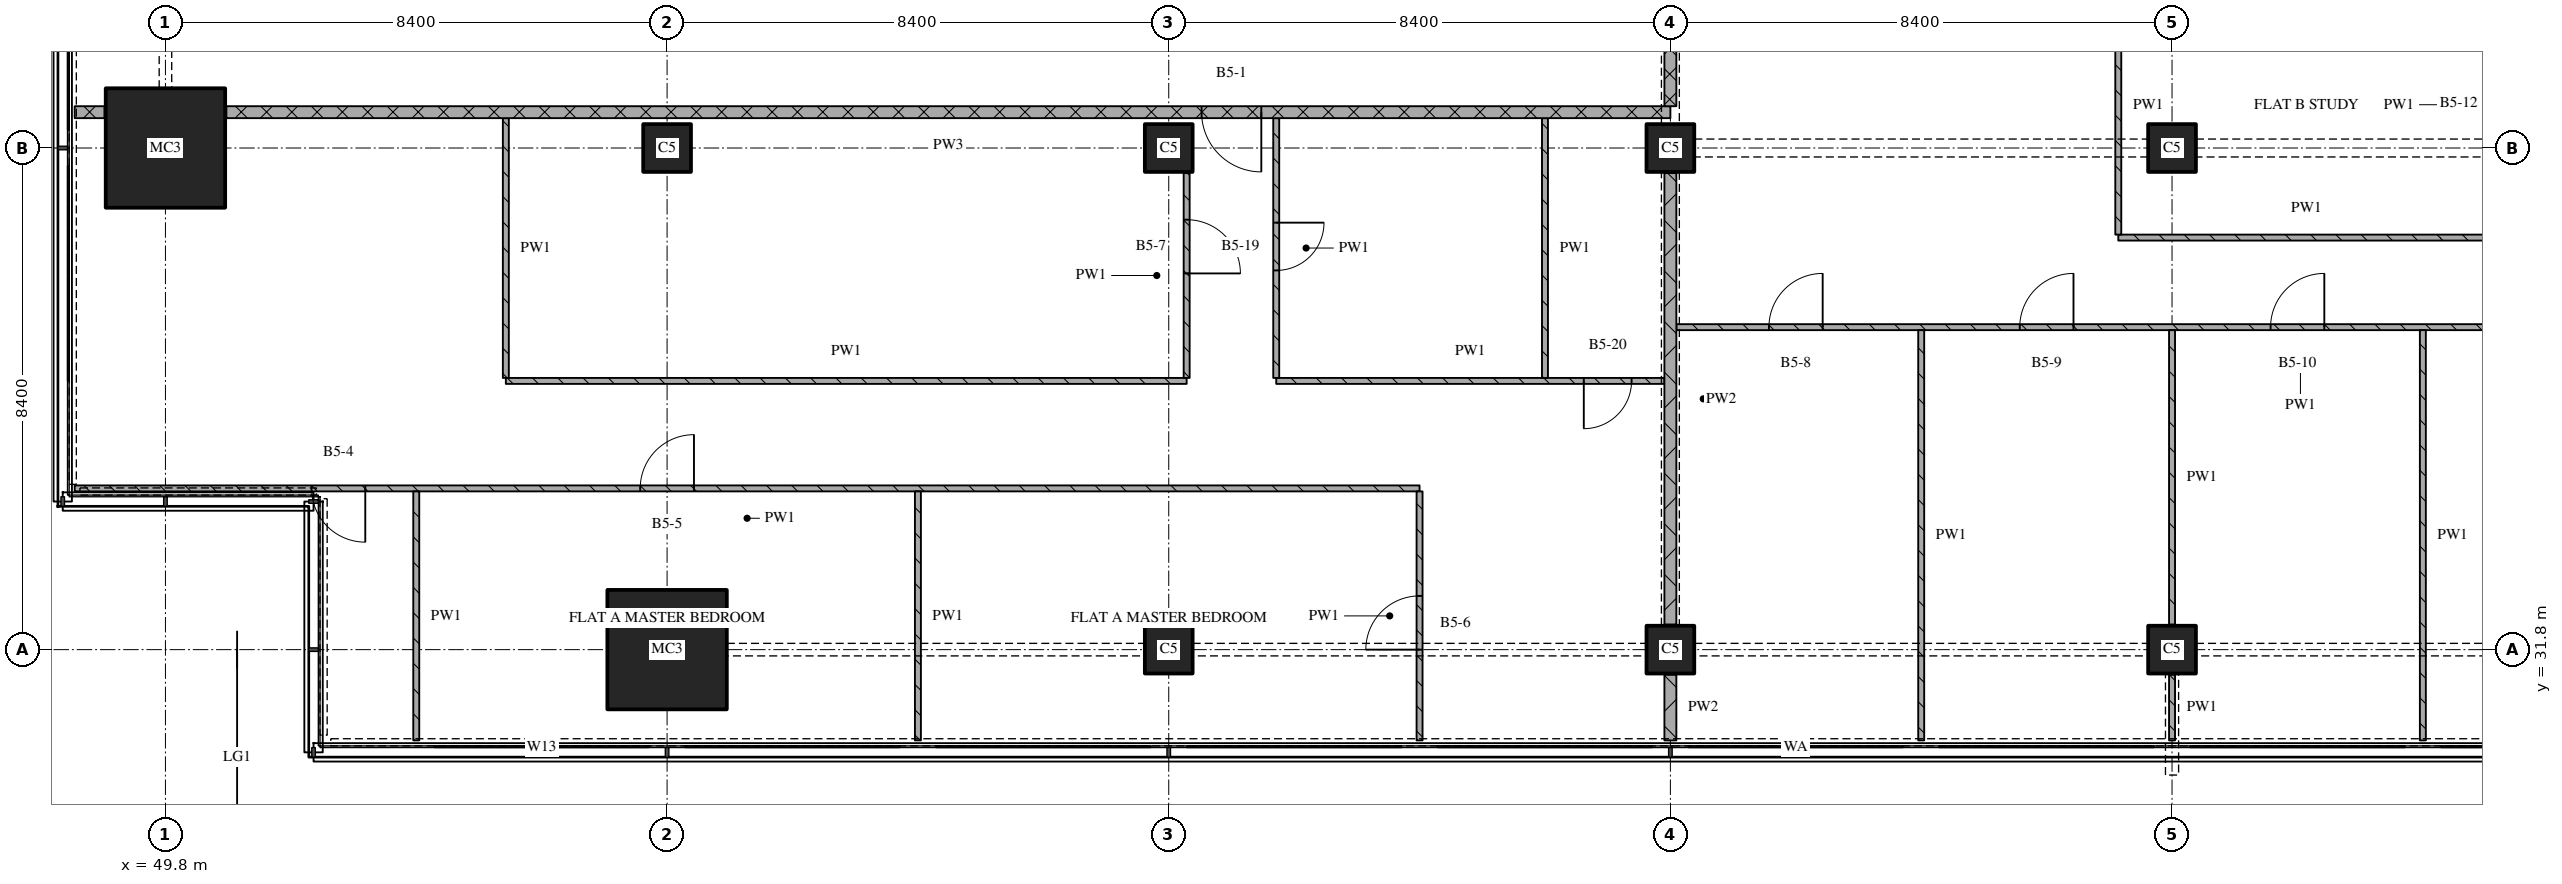
"""IFC4 building model, lengths in metres.
Left out: names, types, materials, properties, quantities, classifications, styles, units other than length and angle.
Written with IfcOpenShell. Run it as: python <this file> out.ifc"""

import sys

from ifc_helpers import new_model, si_unit, direction, frame, frame_2d, origin, origin_2d, place, context, subcontext, project, spatial, rectangle, extrude, element, fill, save


model = new_model("IFC4")
c1 = context("Model", 3, precision=1e-05, world=origin(), true_north=direction((0.0, 1.0)))
c2 = subcontext(c1, "Body", "Model", "MODEL_VIEW")
j1 = project(units=[si_unit("LENGTHUNIT", "METRE"), si_unit("PLANEANGLEUNIT", "RADIAN")], contexts=[c1])
p1 = place(None, origin())
s1 = spatial("IfcSite", under=j1, at=p1, CompositionType="ELEMENT")
p2 = place(p1, origin())
s2 = spatial("IfcBuilding", under=s1, at=p2, CompositionType="ELEMENT")
p3 = place(p2, frame((0.0, 0.0, 138.45)))
s3 = spatial("IfcBuildingStorey", under=s2, at=p3, CompositionType="ELEMENT", Elevation=138.45)
for number, where, z_axis, x_axis in (
    (1, (49.8, 40.2, 0.0), (0.0, 0.0, 1.0), (1.0, 0.0, 0.0)),
    (2, (58.2, 31.8, 0.0), (0.0, 0.0, 1.0), (1.0, 0.0, 0.0)),
):
    element("IfcColumn", number, at=place(p3, frame(where, z_axis=z_axis, x_axis=x_axis)), inside=s3, PredefinedType="COLUMN", context=c2, shape_type="SweptSolid", body=[
        extrude(rectangle(XDim=2.0, YDim=2.0, at=origin_2d()), origin(), (0.0, 0.0, 1.0), 3.6),
    ])
for number, where, z_axis, x_axis in (
    (3, (58.2, 40.2, 0.0), (0.0, 0.0, 1.0), (1.0, 0.0, 0.0)),
    (4, (66.6, 31.8, 0.0), (0.0, 0.0, 1.0), (1.0, 0.0, 0.0)),
    (5, (66.6, 40.2, 0.0), (0.0, 0.0, 1.0), (1.0, 0.0, 0.0)),
    (6, (75.0, 31.8, 0.0), (0.0, 0.0, 1.0), (1.0, 0.0, 0.0)),
    (7, (75.0, 40.2, 0.0), (0.0, 0.0, 1.0), (1.0, 0.0, 0.0)),
    (8, (83.4, 31.8, 0.0), (0.0, 0.0, 1.0), (1.0, 0.0, 0.0)),
    (9, (83.4, 40.2, 0.0), (0.0, 0.0, 1.0), (1.0, 0.0, 0.0)),
):
    element("IfcColumn", number, at=place(p3, frame(where, z_axis=z_axis, x_axis=x_axis)), inside=s3, PredefinedType="COLUMN", context=c2, shape_type="SweptSolid", body=[
        extrude(rectangle(XDim=0.8, YDim=0.8, at=origin_2d()), origin(), (0.0, 0.0, 1.0), 3.6),
    ])
p4 = place(p3, frame((70.8, 34.5, 0.0), z_axis=(0.0, 0.0, 1.0), x_axis=(-1.0, 0.0, 0.0)))
e10 = element("IfcWall", 10, at=p4, inside=s3, PredefinedType="PARTITIONING", context=c2, shape_type="SweptSolid", body=[
    extrude(rectangle(XDim=22.52, YDim=0.1, at=frame_2d((11.26, 0.0))), origin(), (0.0, 0.0, 1.0), 3.3),
])
p5 = place(p4, frame((12.15, 0.0, 0.0)))
e11 = element("IfcOpeningElement", 11, at=p5, cuts=e10, PredefinedType="OPENING", context=c2, shape_type="SweptSolid", body=[
    extrude(rectangle(XDim=0.9, YDim=2.1, at=frame_2d((0.45, 1.05))), frame((0.0, 0.06, 0.0), z_axis=(0.0, -1.0, 0.0), x_axis=(1.0, 0.0, 0.0)), (0.0, 0.0, 1.0), 0.12),
])
p6 = place(p4, frame((17.654, 0.0, 0.0)))
e12 = element("IfcOpeningElement", 12, at=p6, cuts=e10, PredefinedType="OPENING", context=c2, shape_type="SweptSolid", body=[
    extrude(rectangle(XDim=0.9, YDim=2.1, at=frame_2d((0.45, 1.05))), frame((0.0, 0.06, 0.0), z_axis=(0.0, -1.0, 0.0), x_axis=(1.0, 0.0, 0.0)), (0.0, 0.0, 1.0), 0.12),
])
p7 = place(p3, frame((55.5, 36.3, 0.0), z_axis=(0.0, 0.0, 1.0), x_axis=(1.0, 0.0, 0.0)))
e13 = element("IfcWall", 13, at=p7, inside=s3, PredefinedType="PARTITIONING", context=c2, shape_type="SweptSolid", body=[
    extrude(rectangle(XDim=11.4, YDim=0.1, at=frame_2d((5.7, 0.0))), origin(), (0.0, 0.0, 1.0), 3.3),
])
p8 = place(p3, frame((68.4, 36.3, 0.0), z_axis=(0.0, 0.0, 1.0), x_axis=(1.0, 0.0, 0.0)))
e14 = element("IfcWall", 14, at=p8, inside=s3, PredefinedType="PARTITIONING", context=c2, shape_type="SweptSolid", body=[
    extrude(rectangle(XDim=6.5, YDim=0.1, at=frame_2d((3.25, 0.0))), origin(), (0.0, 0.0, 1.0), 3.3),
])
p9 = place(p8, frame((5.15, 0.0, 0.0)))
e15 = element("IfcOpeningElement", 15, at=p9, cuts=e14, PredefinedType="OPENING", context=c2, shape_type="SweptSolid", body=[
    extrude(rectangle(XDim=0.8, YDim=2.1, at=frame_2d((0.4, 1.05))), frame((0.0, 0.06, 0.0), z_axis=(0.0, -1.0, 0.0), x_axis=(1.0, 0.0, 0.0)), (0.0, 0.0, 1.0), 0.12),
])
p10 = place(p3, frame((96.0, 37.2, 0.0), z_axis=(0.0, 0.0, 1.0), x_axis=(-1.0, 0.0, 0.0)))
e16 = element("IfcWall", 16, at=p10, inside=s3, PredefinedType="PARTITIONING", context=c2, shape_type="SweptSolid", body=[
    extrude(rectangle(XDim=20.9, YDim=0.1, at=frame_2d((10.45, 0.0))), origin(), (0.0, 0.0, 1.0), 3.3),
])
p11 = place(p10, frame((10.05, 0.0, 0.0)))
e17 = element("IfcOpeningElement", 17, at=p11, cuts=e16, PredefinedType="OPENING", context=c2, shape_type="SweptSolid", body=[
    extrude(rectangle(XDim=0.9, YDim=2.1, at=frame_2d((0.45, 1.05))), frame((0.0, 0.06, 0.0), z_axis=(0.0, -1.0, 0.0), x_axis=(1.0, 0.0, 0.0)), (0.0, 0.0, 1.0), 0.12),
])
p12 = place(p10, frame((14.25, 0.0, 0.0)))
e18 = element("IfcOpeningElement", 18, at=p12, cuts=e16, PredefinedType="OPENING", context=c2, shape_type="SweptSolid", body=[
    extrude(rectangle(XDim=0.9, YDim=2.1, at=frame_2d((0.45, 1.05))), frame((0.0, 0.06, 0.0), z_axis=(0.0, -1.0, 0.0), x_axis=(1.0, 0.0, 0.0)), (0.0, 0.0, 1.0), 0.12),
])
p13 = place(p10, frame((18.45, 0.0, 0.0)))
e19 = element("IfcOpeningElement", 19, at=p13, cuts=e16, PredefinedType="OPENING", context=c2, shape_type="SweptSolid", body=[
    extrude(rectangle(XDim=0.9, YDim=2.1, at=frame_2d((0.45, 1.05))), frame((0.0, 0.06, 0.0), z_axis=(0.0, -1.0, 0.0), x_axis=(1.0, 0.0, 0.0)), (0.0, 0.0, 1.0), 0.12),
])
p14 = place(p3, frame((82.5, 38.7, 0.0), z_axis=(0.0, 0.0, 1.0), x_axis=(1.0, 0.0, 0.0)))
e20 = element("IfcWall", 20, at=p14, inside=s3, PredefinedType="PARTITIONING", context=c2, shape_type="SweptSolid", body=[
    extrude(rectangle(XDim=6.3, YDim=0.1, at=frame_2d((3.15, 0.0))), origin(), (0.0, 0.0, 1.0), 3.3),
])
p15 = place(p3, frame((48.28, 40.8, 0.0), z_axis=(0.0, 0.0, 1.0), x_axis=(1.0, 0.0, 0.0)))
e21 = element("IfcWall", 21, at=p15, inside=s3, PredefinedType="PARTITIONING", context=c2, shape_type="SweptSolid", body=[
    extrude(rectangle(XDim=0.5, YDim=0.2, at=frame_2d((0.25, 0.0))), origin(), (0.0, 0.0, 1.0), 3.3),
])
p16 = place(p3, frame((75.0, 40.8, 0.0), z_axis=(0.0, 0.0, 1.0), x_axis=(-1.0, 0.0, 0.0)))
e22 = element("IfcWall", 22, at=p16, inside=s3, PredefinedType="PARTITIONING", context=c2, shape_type="SweptSolid", body=[
    extrude(rectangle(XDim=24.18, YDim=0.2, at=frame_2d((12.09, 0.0))), origin(), (0.0, 0.0, 1.0), 3.3),
])
p17 = place(p16, frame((6.85, 0.0, 0.0)))
e23 = element("IfcOpeningElement", 23, at=p17, cuts=e22, PredefinedType="OPENING", context=c2, shape_type="SweptSolid", body=[
    extrude(rectangle(XDim=1.0, YDim=2.1, at=frame_2d((0.5, 1.05))), frame((0.0, 0.11, 0.0), z_axis=(0.0, -1.0, 0.0), x_axis=(1.0, 0.0, 0.0)), (0.0, 0.0, 1.0), 0.22),
])
p18 = place(p3, frame((54.0, 34.45, 0.0), z_axis=(0.0, 0.0, 1.0), x_axis=(0.0, -1.0, 0.0)))
e24 = element("IfcWall", 24, at=p18, inside=s3, PredefinedType="PARTITIONING", context=c2, shape_type="SweptSolid", body=[
    extrude(rectangle(XDim=4.17, YDim=0.1, at=frame_2d((2.085, 0.0))), origin(), (0.0, 0.0, 1.0), 3.3),
])
p19 = place(p3, frame((55.5, 40.7, 0.0), z_axis=(0.0, 0.0, 1.0), x_axis=(0.0, -1.0, 0.0)))
e25 = element("IfcWall", 25, at=p19, inside=s3, PredefinedType="PARTITIONING", context=c2, shape_type="SweptSolid", body=[
    extrude(rectangle(XDim=4.35, YDim=0.1, at=frame_2d((2.175, 0.0))), origin(), (0.0, 0.0, 1.0), 3.3),
])
p20 = place(p3, frame((62.4, 34.45, 0.0), z_axis=(0.0, 0.0, 1.0), x_axis=(0.0, -1.0, 0.0)))
e26 = element("IfcWall", 26, at=p20, inside=s3, PredefinedType="PARTITIONING", context=c2, shape_type="SweptSolid", body=[
    extrude(rectangle(XDim=4.17, YDim=0.1, at=frame_2d((2.085, 0.0))), origin(), (0.0, 0.0, 1.0), 3.3),
])
p21 = place(p3, frame((66.9, 36.35, 0.0), z_axis=(0.0, 0.0, 1.0), x_axis=(0.0, 1.0, 0.0)))
e27 = element("IfcWall", 27, at=p21, inside=s3, PredefinedType="PARTITIONING", context=c2, shape_type="SweptSolid", body=[
    extrude(rectangle(XDim=3.43, YDim=0.1, at=frame_2d((1.715, 0.0))), origin(), (0.0, 0.0, 1.0), 3.3),
])
p22 = place(p21, frame((1.75, 0.0, 0.0)))
e28 = element("IfcOpeningElement", 28, at=p22, cuts=e27, PredefinedType="OPENING", context=c2, shape_type="SweptSolid", body=[
    extrude(rectangle(XDim=0.9, YDim=2.1, at=frame_2d((0.45, 1.05))), frame((0.0, 0.06, 0.0), z_axis=(0.0, -1.0, 0.0), x_axis=(1.0, 0.0, 0.0)), (0.0, 0.0, 1.0), 0.12),
])
p23 = place(p3, frame((68.4, 40.7, 0.0), z_axis=(0.0, 0.0, 1.0), x_axis=(0.0, -1.0, 0.0)))
e29 = element("IfcWall", 29, at=p23, inside=s3, PredefinedType="PARTITIONING", context=c2, shape_type="SweptSolid", body=[
    extrude(rectangle(XDim=4.35, YDim=0.1, at=frame_2d((2.175, 0.0))), origin(), (0.0, 0.0, 1.0), 3.3),
])
p24 = place(p23, frame((1.75, 0.0, 0.0)))
e30 = element("IfcOpeningElement", 30, at=p24, cuts=e29, PredefinedType="OPENING", context=c2, shape_type="SweptSolid", body=[
    extrude(rectangle(XDim=0.8, YDim=2.1, at=frame_2d((0.4, 1.05))), frame((0.0, 0.06, 0.0), z_axis=(0.0, -1.0, 0.0), x_axis=(1.0, 0.0, 0.0)), (0.0, 0.0, 1.0), 0.12),
])
p25 = place(p3, frame((70.8, 30.28, 0.0), z_axis=(0.0, 0.0, 1.0), x_axis=(0.0, 1.0, 0.0)))
e31 = element("IfcWall", 31, at=p25, inside=s3, PredefinedType="PARTITIONING", context=c2, shape_type="SweptSolid", body=[
    extrude(rectangle(XDim=4.17, YDim=0.1, at=frame_2d((2.085, 0.0))), origin(), (0.0, 0.0, 1.0), 3.3),
])
p26 = place(p25, frame((1.52, 0.0, 0.0)))
e32 = element("IfcOpeningElement", 32, at=p26, cuts=e31, PredefinedType="OPENING", context=c2, shape_type="SweptSolid", body=[
    extrude(rectangle(XDim=0.9, YDim=2.1, at=frame_2d((0.45, 1.05))), frame((0.0, 0.06, 0.0), z_axis=(0.0, -1.0, 0.0), x_axis=(1.0, 0.0, 0.0)), (0.0, 0.0, 1.0), 0.12),
])
p27 = place(p3, frame((72.9, 40.7, 0.0), z_axis=(0.0, 0.0, 1.0), x_axis=(0.0, -1.0, 0.0)))
e33 = element("IfcWall", 33, at=p27, inside=s3, PredefinedType="PARTITIONING", context=c2, shape_type="SweptSolid", body=[
    extrude(rectangle(XDim=4.35, YDim=0.1, at=frame_2d((2.175, 0.0))), origin(), (0.0, 0.0, 1.0), 3.3),
])
p28 = place(p3, frame((75.0, 43.1, 0.0), z_axis=(0.0, 0.0, 1.0), x_axis=(0.0, -1.0, 0.0)))
e34 = element("IfcWall", 34, at=p28, inside=s3, PredefinedType="PARTITIONING", context=c2, shape_type="SweptSolid", body=[
    extrude(rectangle(XDim=2.2, YDim=0.2, at=frame_2d((1.1, 0.0))), origin(), (0.0, 0.0, 1.0), 2.41),
])
p29 = place(p3, frame((75.0, 31.38, 0.0), z_axis=(0.0, 0.0, 1.0), x_axis=(0.0, -1.0, 0.0)))
e35 = element("IfcWall", 35, at=p29, inside=s3, PredefinedType="PARTITIONING", context=c2, shape_type="SweptSolid", body=[
    extrude(rectangle(XDim=1.1, YDim=0.2, at=frame_2d((0.55, 0.0))), origin(), (0.0, 0.0, 1.0), 3.3),
])
p30 = place(p3, frame((75.0, 39.78, 0.0), z_axis=(0.0, 0.0, 1.0), x_axis=(0.0, -1.0, 0.0)))
e36 = element("IfcWall", 36, at=p30, inside=s3, PredefinedType="PARTITIONING", context=c2, shape_type="SweptSolid", body=[
    extrude(rectangle(XDim=7.56, YDim=0.2, at=frame_2d((3.78, 0.0))), origin(), (0.0, 0.0, 1.0), 2.81),
])
p31 = place(p3, frame((79.2, 37.15, 0.0), z_axis=(0.0, 0.0, 1.0), x_axis=(0.0, -1.0, 0.0)))
e37 = element("IfcWall", 37, at=p31, inside=s3, PredefinedType="PARTITIONING", context=c2, shape_type="SweptSolid", body=[
    extrude(rectangle(XDim=6.87, YDim=0.1, at=frame_2d((3.435, 0.0))), origin(), (0.0, 0.0, 1.0), 3.3),
])
p32 = place(p3, frame((82.5, 43.1, 0.0), z_axis=(0.0, 0.0, 1.0), x_axis=(0.0, -1.0, 0.0)))
e38 = element("IfcWall", 38, at=p32, inside=s3, PredefinedType="PARTITIONING", context=c2, shape_type="SweptSolid", body=[
    extrude(rectangle(XDim=4.35, YDim=0.1, at=frame_2d((2.175, 0.0))), origin(), (0.0, 0.0, 1.0), 3.3),
])
p33 = place(p3, frame((83.4, 31.38, 0.0), z_axis=(0.0, 0.0, 1.0), x_axis=(0.0, -1.0, 0.0)))
e39 = element("IfcWall", 39, at=p33, inside=s3, PredefinedType="PARTITIONING", context=c2, shape_type="SweptSolid", body=[
    extrude(rectangle(XDim=1.1, YDim=0.1, at=frame_2d((0.55, 0.0))), origin(), (0.0, 0.0, 1.0), 3.3),
])
p34 = place(p3, frame((83.4, 37.15, 0.0), z_axis=(0.0, 0.0, 1.0), x_axis=(0.0, -1.0, 0.0)))
e40 = element("IfcWall", 40, at=p34, inside=s3, PredefinedType="PARTITIONING", context=c2, shape_type="SweptSolid", body=[
    extrude(rectangle(XDim=4.93, YDim=0.1, at=frame_2d((2.465, 0.0))), origin(), (0.0, 0.0, 1.0), 3.3),
])
p35 = place(p3, frame((87.6, 37.15, 0.0), z_axis=(0.0, 0.0, 1.0), x_axis=(0.0, -1.0, 0.0)))
e41 = element("IfcWall", 41, at=p35, inside=s3, PredefinedType="PARTITIONING", context=c2, shape_type="SweptSolid", body=[
    extrude(rectangle(XDim=6.87, YDim=0.1, at=frame_2d((3.435, 0.0))), origin(), (0.0, 0.0, 1.0), 3.3),
])
p36 = place(p5, origin())
e42 = element("IfcDoor", 42, at=p36, inside=s3, OperationType="SINGLE_SWING_RIGHT", PredefinedType="DOOR", context=c2, shape_type="SweptSolid", body=[
    extrude(rectangle(XDim=0.9, YDim=2.1, at=frame_2d((0.45, 1.05))), frame((0.0, 0.025, 0.0), z_axis=(0.0, -1.0, 0.0), x_axis=(1.0, 0.0, 0.0)), (0.0, 0.0, 1.0), 0.05),
])
fill(e11, e42)
p37 = place(p6, origin())
e43 = element("IfcDoor", 43, at=p37, inside=s3, OperationType="SINGLE_SWING_LEFT", PredefinedType="DOOR", context=c2, shape_type="SweptSolid", body=[
    extrude(rectangle(XDim=0.9, YDim=2.1, at=frame_2d((0.45, 1.05))), frame((0.0, 0.025, 0.0), z_axis=(0.0, -1.0, 0.0), x_axis=(1.0, 0.0, 0.0)), (0.0, 0.0, 1.0), 0.05),
])
fill(e12, e43)
p38 = place(p9, origin())
e44 = element("IfcDoor", 44, at=p38, inside=s3, OperationType="SINGLE_SWING_RIGHT", PredefinedType="DOOR", context=c2, shape_type="SweptSolid", body=[
    extrude(rectangle(XDim=0.8, YDim=2.1, at=frame_2d((0.4, 1.05))), frame((0.0, 0.025, 0.0), z_axis=(0.0, -1.0, 0.0), x_axis=(1.0, 0.0, 0.0)), (0.0, 0.0, 1.0), 0.05),
])
fill(e15, e44)
p39 = place(p11, origin())
e45 = element("IfcDoor", 45, at=p39, inside=s3, OperationType="SINGLE_SWING_RIGHT", PredefinedType="DOOR", context=c2, shape_type="SweptSolid", body=[
    extrude(rectangle(XDim=0.9, YDim=2.1, at=frame_2d((0.45, 1.05))), frame((0.0, 0.025, 0.0), z_axis=(0.0, -1.0, 0.0), x_axis=(1.0, 0.0, 0.0)), (0.0, 0.0, 1.0), 0.05),
])
fill(e17, e45)
p40 = place(p12, origin())
e46 = element("IfcDoor", 46, at=p40, inside=s3, OperationType="SINGLE_SWING_RIGHT", PredefinedType="DOOR", context=c2, shape_type="SweptSolid", body=[
    extrude(rectangle(XDim=0.9, YDim=2.1, at=frame_2d((0.45, 1.05))), frame((0.0, 0.025, 0.0), z_axis=(0.0, -1.0, 0.0), x_axis=(1.0, 0.0, 0.0)), (0.0, 0.0, 1.0), 0.05),
])
fill(e18, e46)
p41 = place(p13, origin())
e47 = element("IfcDoor", 47, at=p41, inside=s3, OperationType="SINGLE_SWING_RIGHT", PredefinedType="DOOR", context=c2, shape_type="SweptSolid", body=[
    extrude(rectangle(XDim=0.9, YDim=2.1, at=frame_2d((0.45, 1.05))), frame((0.0, 0.025, 0.0), z_axis=(0.0, -1.0, 0.0), x_axis=(1.0, 0.0, 0.0)), (0.0, 0.0, 1.0), 0.05),
])
fill(e19, e47)
p42 = place(p17, origin())
e48 = element("IfcDoor", 48, at=p42, inside=s3, OperationType="SINGLE_SWING_LEFT", PredefinedType="DOOR", context=c2, shape_type="SweptSolid", body=[
    extrude(rectangle(XDim=1.0, YDim=2.1, at=frame_2d((0.5, 1.05))), frame((0.0, 0.025, 0.0), z_axis=(0.0, -1.0, 0.0), x_axis=(1.0, 0.0, 0.0)), (0.0, 0.0, 1.0), 0.05),
])
fill(e23, e48)
p43 = place(p22, origin())
e49 = element("IfcDoor", 49, at=p43, inside=s3, OperationType="SINGLE_SWING_RIGHT", PredefinedType="DOOR", context=c2, shape_type="SweptSolid", body=[
    extrude(rectangle(XDim=0.9, YDim=2.1, at=frame_2d((0.45, 1.05))), frame((0.0, 0.025, 0.0), z_axis=(0.0, -1.0, 0.0), x_axis=(1.0, 0.0, 0.0)), (0.0, 0.0, 1.0), 0.05),
])
fill(e28, e49)
p44 = place(p24, origin())
e50 = element("IfcDoor", 50, at=p44, inside=s3, OperationType="SINGLE_SWING_LEFT", PredefinedType="DOOR", context=c2, shape_type="SweptSolid", body=[
    extrude(rectangle(XDim=0.8, YDim=2.1, at=frame_2d((0.4, 1.05))), frame((0.0, 0.025, 0.0), z_axis=(0.0, -1.0, 0.0), x_axis=(1.0, 0.0, 0.0)), (0.0, 0.0, 1.0), 0.05),
])
fill(e30, e50)
p45 = place(p26, origin())
e51 = element("IfcDoor", 51, at=p45, inside=s3, OperationType="SINGLE_SWING_LEFT", PredefinedType="DOOR", context=c2, shape_type="SweptSolid", body=[
    extrude(rectangle(XDim=0.9, YDim=2.1, at=frame_2d((0.45, 1.05))), frame((0.0, 0.025, 0.0), z_axis=(0.0, -1.0, 0.0), x_axis=(1.0, 0.0, 0.0)), (0.0, 0.0, 1.0), 0.05),
])
fill(e32, e51)
save(model, sys.argv[1])
